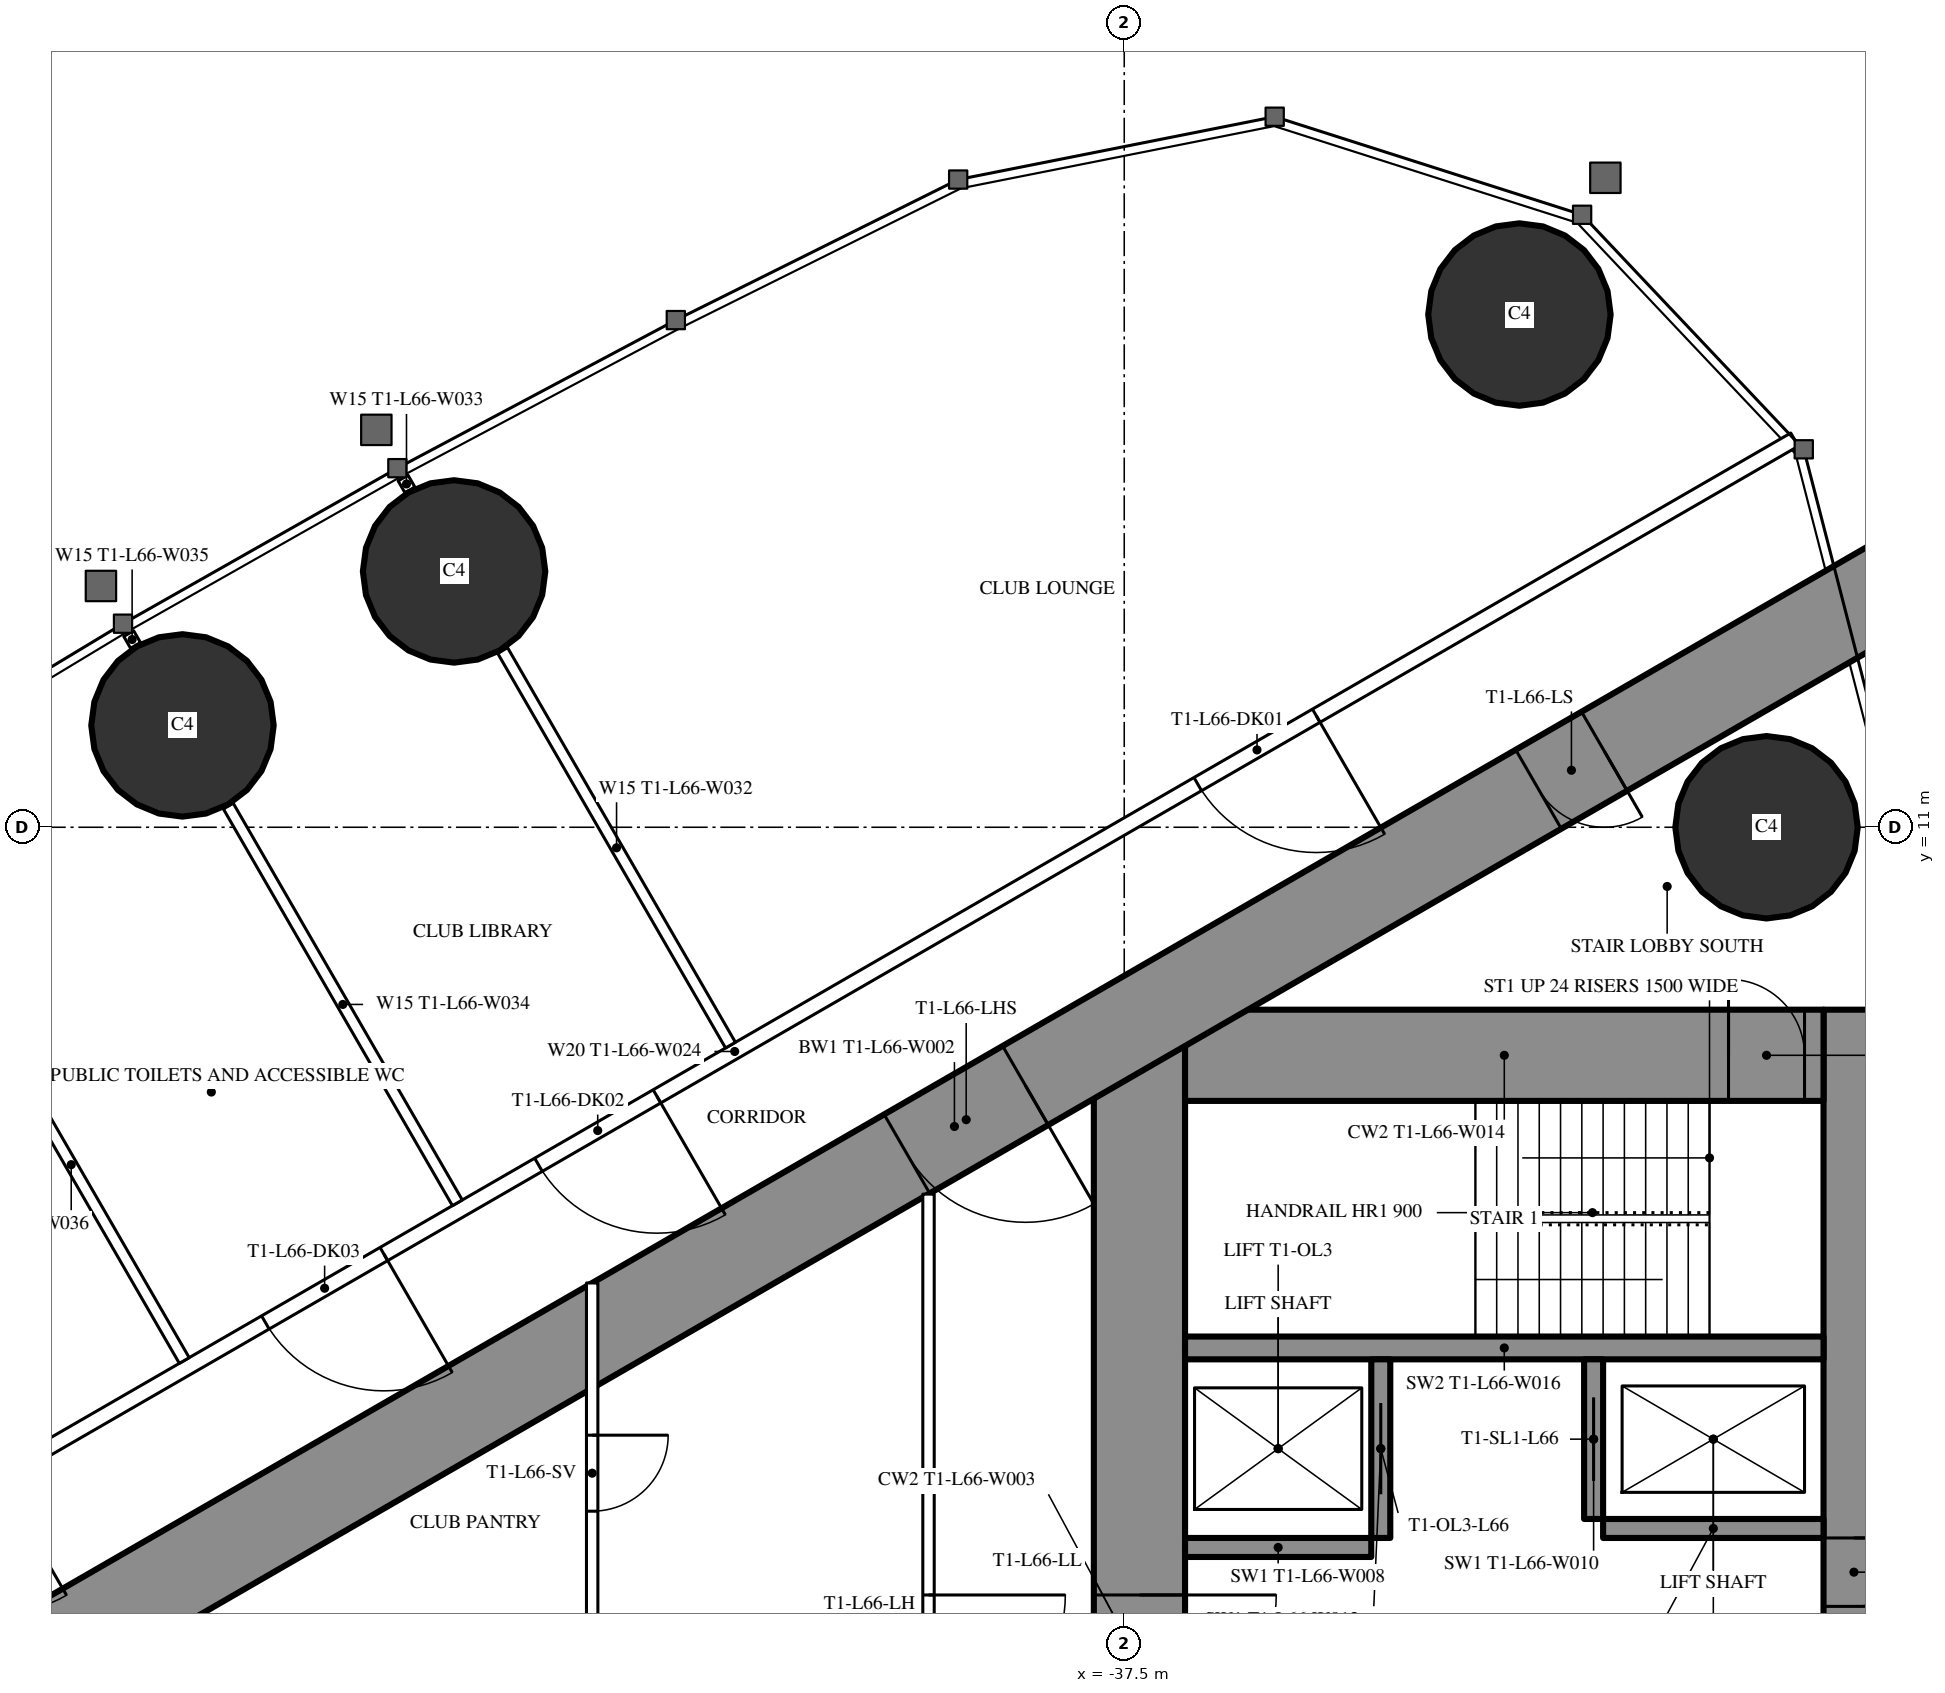
"""IFC4 building model, lengths in metres.
Left out: names, types, materials, properties, quantities, classifications, styles, units other than length and angle.
Written with IfcOpenShell. Run it as: python <this file> out.ifc"""

import sys

from ifc_helpers import new_model, si_unit, direction, frame, frame_2d, origin, origin_2d, place, context, subcontext, project, spatial, rectangle, circle, extrude, element, fill, save


model = new_model("IFC4")
c1 = context("Model", 3, precision=1e-05, world=origin(), true_north=direction((0.0, 1.0)))
c2 = subcontext(c1, "Body", "Model", "MODEL_VIEW")
j1 = project(units=[si_unit("LENGTHUNIT", "METRE"), si_unit("PLANEANGLEUNIT", "RADIAN")], contexts=[c1])
p1 = place(None, origin())
s1 = spatial("IfcSite", under=j1, at=p1, CompositionType="ELEMENT")
p2 = place(p1, origin())
s2 = spatial("IfcBuilding", under=s1, at=p2, CompositionType="ELEMENT")
p3 = place(p2, frame((0.0, 0.0, 247.7)))
s3 = spatial("IfcBuildingStorey", under=s2, at=p3, CompositionType="ELEMENT", Elevation=247.7)
for number, where, z_axis, x_axis in (
    (1, (-32.301, 17.745, 0.0), (0.0, 0.0, 1.0), (1.0, 0.0, 0.0)),
    (2, (-29.05, 11.0, 0.0), (0.0, 0.0, 1.0), (1.0, 0.0, 0.0)),
    (3, (-46.317, 14.365, 0.0), (0.0, 0.0, 1.0), (1.0, 0.0, 0.0)),
    (4, (-49.89, 12.34, 0.0), (0.0, 0.0, 1.0), (1.0, 0.0, 0.0)),
):
    element("IfcColumn", number, at=place(p3, frame(where, z_axis=z_axis, x_axis=x_axis)), inside=s3, PredefinedType="COLUMN", context=c2, shape_type="SweptSolid", body=[
        extrude(circle(Radius=1.2, at=origin_2d()), origin(), (0.0, 0.0, 1.0), 4.2),
    ])
p4 = place(p3, frame((-27.9, 8.6, 0.0), z_axis=(0.0, 0.0, 1.0), x_axis=(0.0, -1.0, 0.0)))
e5 = element("IfcWall", 5, at=p4, inside=s3, PredefinedType="SHEAR", context=c2, shape_type="SweptSolid", body=[
    extrude(rectangle(XDim=17.2, YDim=0.8, at=frame_2d((8.6, 0.0))), origin(), (0.0, 0.0, 1.0), 4.2),
])
p5 = place(p4, frame((6.95, 0.0, 0.0)))
e6 = element("IfcOpeningElement", 6, at=p5, cuts=e5, PredefinedType="OPENING", context=c2, shape_type="SweptSolid", body=[
    extrude(rectangle(XDim=0.9, YDim=2.2, at=frame_2d((0.45, 1.1))), frame((0.0, 0.41, 0.0), z_axis=(0.0, -1.0, 0.0), x_axis=(1.0, 0.0, 0.0)), (0.0, 0.0, 1.0), 0.82),
])
p6 = place(p3, frame((-37.3, 8.6, 0.0), z_axis=(0.0, 0.0, 1.0), x_axis=(0.0, -1.0, 0.0)))
e7 = element("IfcWall", 7, at=p6, inside=s3, PredefinedType="SHEAR", context=c2, shape_type="SweptSolid", body=[
    extrude(rectangle(XDim=17.2, YDim=1.2, at=frame_2d((8.6, 0.0))), origin(), (0.0, 0.0, 1.0), 4.2),
])
p7 = place(p6, frame((7.7, 0.0, 0.0)))
e8 = element("IfcOpeningElement", 8, at=p7, cuts=e7, PredefinedType="OPENING", context=c2, shape_type="SweptSolid", body=[
    extrude(rectangle(XDim=1.8, YDim=2.2, at=frame_2d((0.9, 1.1))), frame((0.0, 0.61, 0.0), z_axis=(0.0, -1.0, 0.0), x_axis=(1.0, 0.0, 0.0)), (0.0, 0.0, 1.0), 1.22),
])
p8 = place(p3, frame((-28.3, 8.0, 0.0), z_axis=(0.0, 0.0, 1.0), x_axis=(-1.0, 0.0, 0.0)))
e9 = element("IfcWall", 9, at=p8, inside=s3, PredefinedType="SHEAR", context=c2, shape_type="SweptSolid", body=[
    extrude(rectangle(XDim=8.4, YDim=1.2, at=frame_2d((4.2, 0.0))), origin(), (0.0, 0.0, 1.0), 4.2),
])
p9 = place(p8, frame((0.25, 0.0, 0.0)))
e10 = element("IfcOpeningElement", 10, at=p9, cuts=e9, PredefinedType="OPENING", context=c2, shape_type="SweptSolid", body=[
    extrude(rectangle(XDim=1.0, YDim=2.2, at=frame_2d((0.5, 1.1))), frame((0.0, 0.61, 0.0), z_axis=(0.0, -1.0, 0.0), x_axis=(1.0, 0.0, 0.0)), (0.0, 0.0, 1.0), 1.22),
])
p10 = place(p3, frame((-28.3, 4.15, 0.0), z_axis=(0.0, 0.0, 1.0), x_axis=(-1.0, 0.0, 0.0)))
e11 = element("IfcWall", 11, at=p10, inside=s3, PredefinedType="SHEAR", context=c2, shape_type="SweptSolid", body=[
    extrude(rectangle(XDim=8.4, YDim=0.3, at=frame_2d((4.2, 0.0))), origin(), (0.0, 0.0, 1.0), 4.2),
])
p11 = place(p3, frame((-31.325, 4.0, 0.0), z_axis=(0.0, 0.0, 1.0), x_axis=(0.0, -1.0, 0.0)))
e12 = element("IfcWall", 12, at=p11, inside=s3, PredefinedType="SHEAR", context=c2, shape_type="SweptSolid", body=[
    extrude(rectangle(XDim=2.1, YDim=0.25, at=frame_2d((1.05, 0.0))), origin(), (0.0, 0.0, 1.0), 4.2),
])
p12 = place(p11, frame((0.5, 0.0, 0.0)))
e13 = element("IfcOpeningElement", 13, at=p12, cuts=e12, PredefinedType="OPENING", context=c2, shape_type="SweptSolid", body=[
    extrude(rectangle(XDim=1.1, YDim=2.2, at=frame_2d((0.55, 1.1))), frame((0.0, 0.135, 0.0), z_axis=(0.0, -1.0, 0.0), x_axis=(1.0, 0.0, 0.0)), (0.0, 0.0, 1.0), 0.27),
])
p13 = place(p3, frame((-34.125, 4.0, 0.0), z_axis=(0.0, 0.0, 1.0), x_axis=(0.0, -1.0, 0.0)))
e14 = element("IfcWall", 14, at=p13, inside=s3, PredefinedType="SHEAR", context=c2, shape_type="SweptSolid", body=[
    extrude(rectangle(XDim=2.35, YDim=0.25, at=frame_2d((1.175, 0.0))), origin(), (0.0, 0.0, 1.0), 4.2),
])
p14 = place(p13, frame((0.575, 0.0, 0.0)))
e15 = element("IfcOpeningElement", 15, at=p14, cuts=e14, PredefinedType="OPENING", context=c2, shape_type="SweptSolid", body=[
    extrude(rectangle(XDim=1.2, YDim=2.2, at=frame_2d((0.6, 1.1))), frame((0.0, 0.135, 0.0), z_axis=(0.0, -1.0, 0.0), x_axis=(1.0, 0.0, 0.0)), (0.0, 0.0, 1.0), 0.27),
])
p15 = place(p3, frame((-28.3, 1.775, 0.0), z_axis=(0.0, 0.0, 1.0), x_axis=(-1.0, 0.0, 0.0)))
e16 = element("IfcWall", 16, at=p15, inside=s3, PredefinedType="SHEAR", context=c2, shape_type="SweptSolid", body=[
    extrude(rectangle(XDim=2.9, YDim=0.25, at=frame_2d((1.45, 0.0))), origin(), (0.0, 0.0, 1.0), 4.2),
])
p16 = place(p3, frame((-34.25, 1.525, 0.0), z_axis=(0.0, 0.0, 1.0), x_axis=(-1.0, 0.0, 0.0)))
e17 = element("IfcWall", 17, at=p16, inside=s3, PredefinedType="SHEAR", context=c2, shape_type="SweptSolid", body=[
    extrude(rectangle(XDim=2.45, YDim=0.25, at=frame_2d((1.225, 0.0))), origin(), (0.0, 0.0, 1.0), 4.2),
])
p17 = place(p3, frame((-27.2, 14.3, 0.0), z_axis=(0.0, 0.0, 1.0), x_axis=(-0.866026593062, -0.499997940104, 0.0)))
e18 = element("IfcWall", 18, at=p17, inside=s3, PredefinedType="SHEAR", context=c2, shape_type="SweptSolid", body=[
    extrude(rectangle(XDim=28.946, YDim=1.2, at=frame_2d((14.473, 0.0))), origin(), (0.0, 0.0, 1.0), 4.2),
])
p18 = place(p17, frame((4.6, 0.0, 0.0)))
e19 = element("IfcOpeningElement", 19, at=p18, cuts=e18, PredefinedType="OPENING", context=c2, shape_type="SweptSolid", body=[
    extrude(rectangle(XDim=1.0, YDim=2.2, at=frame_2d((0.5, 1.1))), frame((0.0, 0.61, 0.0), z_axis=(0.0, -1.0, 0.0), x_axis=(1.0, 0.0, 0.0)), (0.0, 0.0, 1.0), 1.22),
])
p19 = place(p17, frame((13.395, 0.0, 0.0)))
e20 = element("IfcOpeningElement", 20, at=p19, cuts=e18, PredefinedType="OPENING", context=c2, shape_type="SweptSolid", body=[
    extrude(rectangle(XDim=1.8, YDim=2.2, at=frame_2d((0.9, 1.1))), frame((0.0, 0.61, 0.0), z_axis=(0.0, -1.0, 0.0), x_axis=(1.0, 0.0, 0.0)), (0.0, 0.0, 1.0), 1.22),
])
p20 = place(p3, frame((-28.681, 16.101, 0.0), z_axis=(0.0, 0.0, 1.0), x_axis=(-0.866024860443, -0.500000941094, 0.0)))
e21 = element("IfcWall", 21, at=p20, inside=s3, PredefinedType="PARTITIONING", context=c2, shape_type="SweptSolid", body=[
    extrude(rectangle(XDim=32.201, YDim=0.2, at=frame_2d((16.101, 0.0))), origin(), (0.0, 0.0, 1.0), 3.95),
])
p21 = place(p20, frame((7.266, 0.0, 0.0)))
e22 = element("IfcOpeningElement", 22, at=p21, cuts=e21, PredefinedType="OPENING", context=c2, shape_type="SweptSolid", body=[
    extrude(rectangle(XDim=1.8, YDim=2.2, at=frame_2d((0.9, 1.1))), frame((0.0, 0.11, 0.0), z_axis=(0.0, -1.0, 0.0), x_axis=(1.0, 0.0, 0.0)), (0.0, 0.0, 1.0), 0.22),
])
p22 = place(p20, frame((17.281, 0.0, 0.0)))
e23 = element("IfcOpeningElement", 23, at=p22, cuts=e21, PredefinedType="OPENING", context=c2, shape_type="SweptSolid", body=[
    extrude(rectangle(XDim=1.8, YDim=2.2, at=frame_2d((0.9, 1.1))), frame((0.0, 0.11, 0.0), z_axis=(0.0, -1.0, 0.0), x_axis=(1.0, 0.0, 0.0)), (0.0, 0.0, 1.0), 0.22),
])
p23 = place(p20, frame((21.43, 0.0, 0.0)))
e24 = element("IfcOpeningElement", 24, at=p23, cuts=e21, PredefinedType="OPENING", context=c2, shape_type="SweptSolid", body=[
    extrude(rectangle(XDim=1.8, YDim=2.2, at=frame_2d((0.9, 1.1))), frame((0.0, 0.11, 0.0), z_axis=(0.0, -1.0, 0.0), x_axis=(1.0, 0.0, 0.0)), (0.0, 0.0, 1.0), 0.22),
])
p24 = place(p20, frame((27.29, 0.0, 0.0)))
e25 = element("IfcOpeningElement", 25, at=p24, cuts=e21, PredefinedType="OPENING", context=c2, shape_type="SweptSolid", body=[
    extrude(rectangle(XDim=1.8, YDim=2.2, at=frame_2d((0.9, 1.1))), frame((0.0, 0.11, 0.0), z_axis=(0.0, -1.0, 0.0), x_axis=(1.0, 0.0, 0.0)), (0.0, 0.0, 1.0), 0.22),
])
p25 = place(p3, frame((-42.68, 8.134, 0.0), z_axis=(0.0, 0.0, 1.0), x_axis=(-0.499984479505, 0.866034364361, 0.0)))
e26 = element("IfcWall", 26, at=p25, inside=s3, PredefinedType="PARTITIONING", context=c2, shape_type="SweptSolid", body=[
    extrude(rectangle(XDim=5.995, YDim=0.15, at=frame_2d((2.998, 0.0))), origin(), (0.0, 0.0, 1.0), 3.05),
])
p26 = place(p3, frame((-46.898, 15.439, 0.0), z_axis=(0.0, 0.0, 1.0), x_axis=(-0.500232303069, 0.865891241997, 0.0)))
e27 = element("IfcWall", 27, at=p26, inside=s3, PredefinedType="PARTITIONING", context=c2, shape_type="SweptSolid", body=[
    extrude(rectangle(XDim=0.18, YDim=0.15, at=frame_2d((0.09, 0.0))), origin(), (0.0, 0.0, 1.0), 3.05),
])
p27 = place(p3, frame((-46.274, 6.059, 0.0), z_axis=(0.0, 0.0, 1.0), x_axis=(-0.500020471368, 0.866013584312, 0.0)))
e28 = element("IfcWall", 28, at=p27, inside=s3, PredefinedType="PARTITIONING", context=c2, shape_type="SweptSolid", body=[
    extrude(rectangle(XDim=6.028, YDim=0.15, at=frame_2d((3.014, 0.0))), origin(), (0.0, 0.0, 1.0), 3.05),
])
p28 = place(p3, frame((-50.508, 13.392, 0.0), z_axis=(0.0, 0.0, 1.0), x_axis=(-0.499644091975, 0.866230789891, 0.0)))
e29 = element("IfcWall", 29, at=p28, inside=s3, PredefinedType="PARTITIONING", context=c2, shape_type="SweptSolid", body=[
    extrude(rectangle(XDim=0.18, YDim=0.15, at=frame_2d((0.09, 0.0))), origin(), (0.0, 0.0, 1.0), 3.05),
])
p29 = place(p3, frame((-49.866, 3.985, 0.0), z_axis=(0.0, 0.0, 1.0), x_axis=(-0.500000694566, 0.866025002776, 0.0)))
e30 = element("IfcWall", 30, at=p29, inside=s3, PredefinedType="PARTITIONING", context=c2, shape_type="SweptSolid", body=[
    extrude(rectangle(XDim=5.95, YDim=0.15, at=frame_2d((2.975, 0.0))), origin(), (0.0, 0.0, 1.0), 3.05),
])
p30 = place(p3, frame((-40.075, 6.174, 0.0), z_axis=(0.0, 0.0, 1.0), x_axis=(0.0, -1.0, 0.0)))
e31 = element("IfcWall", 31, at=p30, inside=s3, PredefinedType="PARTITIONING", context=c2, shape_type="SweptSolid", body=[
    extrude(rectangle(XDim=12.348, YDim=0.15, at=frame_2d((6.174, 0.0))), origin(), (0.0, 0.0, 1.0), 3.95),
])
p31 = place(p30, frame((5.274, 0.0, 0.0)))
e32 = element("IfcOpeningElement", 32, at=p31, cuts=e31, PredefinedType="OPENING", context=c2, shape_type="SweptSolid", body=[
    extrude(rectangle(XDim=1.8, YDim=2.2, at=frame_2d((0.9, 1.1))), frame((0.0, 0.085, 0.0), z_axis=(0.0, -1.0, 0.0), x_axis=(1.0, 0.0, 0.0)), (0.0, 0.0, 1.0), 0.17),
])
p32 = place(p3, frame((-44.5, 5.005, 0.0), z_axis=(0.0, 0.0, 1.0), x_axis=(0.0, -1.0, 0.0)))
e33 = element("IfcWall", 33, at=p32, inside=s3, PredefinedType="PARTITIONING", context=c2, shape_type="SweptSolid", body=[
    extrude(rectangle(XDim=10.009, YDim=0.15, at=frame_2d((5.005, 0.0))), origin(), (0.0, 0.0, 1.0), 3.1),
])
p33 = place(p32, frame((2.002, 0.0, 0.0)))
e34 = element("IfcOpeningElement", 34, at=p33, cuts=e33, PredefinedType="OPENING", context=c2, shape_type="SweptSolid", body=[
    extrude(rectangle(XDim=1.0, YDim=2.2, at=frame_2d((0.5, 1.1))), frame((0.0, 0.085, 0.0), z_axis=(0.0, -1.0, 0.0), x_axis=(1.0, 0.0, 0.0)), (0.0, 0.0, 1.0), 0.17),
])
p34 = place(p32, frame((7.007, 0.0, 0.0)))
e35 = element("IfcOpeningElement", 35, at=p34, cuts=e33, PredefinedType="OPENING", context=c2, shape_type="SweptSolid", body=[
    extrude(rectangle(XDim=1.0, YDim=2.2, at=frame_2d((0.5, 1.1))), frame((0.0, 0.085, 0.0), z_axis=(0.0, -1.0, 0.0), x_axis=(1.0, 0.0, 0.0)), (0.0, 0.0, 1.0), 0.17),
])
p35 = place(p21, origin())
e36 = element("IfcDoor", 36, at=p35, inside=s3, OperationType="DOUBLE_DOOR_SINGLE_SWING", PredefinedType="DOOR", context=c2, shape_type="SweptSolid", body=[
    extrude(rectangle(XDim=1.8, YDim=2.2, at=frame_2d((0.9, 1.1))), frame((0.0, 0.025, 0.0), z_axis=(0.0, -1.0, 0.0), x_axis=(1.0, 0.0, 0.0)), (0.0, 0.0, 1.0), 0.05),
])
fill(e22, e36)
p36 = place(p22, origin())
e37 = element("IfcDoor", 37, at=p36, inside=s3, OperationType="DOUBLE_DOOR_SINGLE_SWING", PredefinedType="DOOR", context=c2, shape_type="SweptSolid", body=[
    extrude(rectangle(XDim=1.8, YDim=2.2, at=frame_2d((0.9, 1.1))), frame((0.0, 0.025, 0.0), z_axis=(0.0, -1.0, 0.0), x_axis=(1.0, 0.0, 0.0)), (0.0, 0.0, 1.0), 0.05),
])
fill(e23, e37)
p37 = place(p23, origin())
e38 = element("IfcDoor", 38, at=p37, inside=s3, OperationType="DOUBLE_DOOR_SINGLE_SWING", PredefinedType="DOOR", context=c2, shape_type="SweptSolid", body=[
    extrude(rectangle(XDim=1.8, YDim=2.2, at=frame_2d((0.9, 1.1))), frame((0.0, 0.025, 0.0), z_axis=(0.0, -1.0, 0.0), x_axis=(1.0, 0.0, 0.0)), (0.0, 0.0, 1.0), 0.05),
])
fill(e24, e38)
p38 = place(p31, origin())
e39 = element("IfcDoor", 39, at=p38, inside=s3, OperationType="DOUBLE_DOOR_SINGLE_SWING", PredefinedType="DOOR", context=c2, shape_type="SweptSolid", body=[
    extrude(rectangle(XDim=1.8, YDim=2.2, at=frame_2d((0.9, 1.1))), frame((0.0, 0.025, 0.0), z_axis=(0.0, -1.0, 0.0), x_axis=(1.0, 0.0, 0.0)), (0.0, 0.0, 1.0), 0.05),
])
fill(e32, e39)
p39 = place(p33, origin())
e40 = element("IfcDoor", 40, at=p39, inside=s3, OperationType="SINGLE_SWING_LEFT", PredefinedType="DOOR", context=c2, shape_type="SweptSolid", body=[
    extrude(rectangle(XDim=1.0, YDim=2.2, at=frame_2d((0.5, 1.1))), frame((0.0, 0.025, 0.0), z_axis=(0.0, -1.0, 0.0), x_axis=(1.0, 0.0, 0.0)), (0.0, 0.0, 1.0), 0.05),
])
fill(e34, e40)
p40 = place(p18, origin())
e41 = element("IfcDoor", 41, at=p40, inside=s3, OperationType="SINGLE_SWING_LEFT", PredefinedType="DOOR", context=c2, shape_type="SweptSolid", body=[
    extrude(rectangle(XDim=1.0, YDim=2.2, at=frame_2d((0.5, 1.1))), frame((0.0, 0.025, 0.0), z_axis=(0.0, -1.0, 0.0), x_axis=(1.0, 0.0, 0.0)), (0.0, 0.0, 1.0), 0.05),
])
fill(e19, e41)
p41 = place(p19, origin())
e42 = element("IfcDoor", 42, at=p41, inside=s3, OperationType="DOUBLE_DOOR_SINGLE_SWING", PredefinedType="DOOR", context=c2, shape_type="SweptSolid", body=[
    extrude(rectangle(XDim=1.8, YDim=2.2, at=frame_2d((0.9, 1.1))), frame((0.0, 0.025, 0.0), z_axis=(0.0, -1.0, 0.0), x_axis=(1.0, 0.0, 0.0)), (0.0, 0.0, 1.0), 0.05),
])
fill(e20, e42)
p42 = place(p7, origin())
e43 = element("IfcDoor", 43, at=p42, inside=s3, OperationType="DOUBLE_DOOR_SINGLE_SWING", PredefinedType="DOOR", context=c2, shape_type="SweptSolid", body=[
    extrude(rectangle(XDim=1.8, YDim=2.2, at=frame_2d((0.9, 1.1))), frame((0.0, 0.025, 0.0), z_axis=(0.0, -1.0, 0.0), x_axis=(1.0, 0.0, 0.0)), (0.0, 0.0, 1.0), 0.05),
])
fill(e8, e43)
p43 = place(p9, origin())
e44 = element("IfcDoor", 44, at=p43, inside=s3, OperationType="SINGLE_SWING_RIGHT", PredefinedType="DOOR", context=c2, shape_type="SweptSolid", body=[
    extrude(rectangle(XDim=1.0, YDim=2.2, at=frame_2d((0.5, 1.1))), frame((0.0, 0.025, 0.0), z_axis=(0.0, -1.0, 0.0), x_axis=(1.0, 0.0, 0.0)), (0.0, 0.0, 1.0), 0.05),
])
fill(e10, e44)
p44 = place(p5, origin())
e45 = element("IfcDoor", 45, at=p44, inside=s3, OperationType="SINGLE_SWING_LEFT", PredefinedType="DOOR", context=c2, shape_type="SweptSolid", body=[
    extrude(rectangle(XDim=0.9, YDim=2.2, at=frame_2d((0.45, 1.1))), frame((0.0, 0.025, 0.0), z_axis=(0.0, -1.0, 0.0), x_axis=(1.0, 0.0, 0.0)), (0.0, 0.0, 1.0), 0.05),
])
fill(e6, e45)
p45 = place(p12, origin())
e46 = element("IfcDoor", 46, at=p45, inside=s3, OperationType="SLIDING_TO_LEFT", PredefinedType="USERDEFINED", context=c2, shape_type="SweptSolid", body=[
    extrude(rectangle(XDim=1.1, YDim=2.2, at=frame_2d((0.55, 1.1))), frame((0.0, 0.025, 0.0), z_axis=(0.0, -1.0, 0.0), x_axis=(1.0, 0.0, 0.0)), (0.0, 0.0, 1.0), 0.05),
])
fill(e13, e46)
p46 = place(p14, origin())
e47 = element("IfcDoor", 47, at=p46, inside=s3, OperationType="DOUBLE_DOOR_SLIDING", PredefinedType="USERDEFINED", context=c2, shape_type="SweptSolid", body=[
    extrude(rectangle(XDim=1.2, YDim=2.2, at=frame_2d((0.6, 1.1))), frame((0.0, 0.025, 0.0), z_axis=(0.0, -1.0, 0.0), x_axis=(1.0, 0.0, 0.0)), (0.0, 0.0, 1.0), 0.05),
])
fill(e15, e47)
save(model, sys.argv[1])
